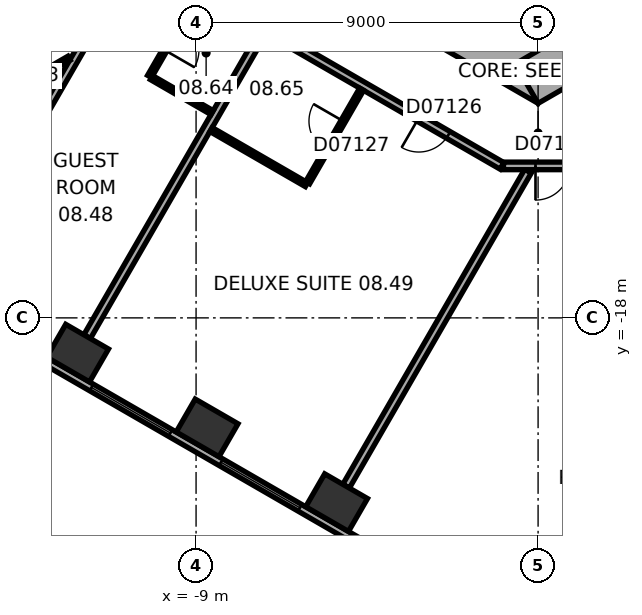
"""IFC4 building model, lengths in metres.
Left out: names, types, materials, properties, quantities, classifications, styles, units other than length and angle.
Written with IfcOpenShell. Run it as: python <this file> out.ifc"""

import sys

from ifc_helpers import new_model, si_unit, direction, frame, frame_2d, origin, origin_2d, place, context, subcontext, project, spatial, rectangle, extrude, element, fill, save


model = new_model("IFC4")
c1 = context("Model", 3, precision=1e-05, world=origin(), true_north=direction((0.0, 1.0)))
c2 = subcontext(c1, "Body", "Model", "MODEL_VIEW")
j1 = project(units=[si_unit("LENGTHUNIT", "METRE"), si_unit("PLANEANGLEUNIT", "RADIAN")], contexts=[c1])
p1 = place(None, origin())
s1 = spatial("IfcSite", under=j1, at=p1, CompositionType="ELEMENT")
p2 = place(p1, origin())
s2 = spatial("IfcBuilding", under=s1, at=p2, CompositionType="ELEMENT")
p3 = place(p2, frame((0.0, 0.0, 47.3)))
s3 = spatial("IfcBuildingStorey", under=s2, at=p3, CompositionType="ELEMENT", Elevation=47.3)
for number, where, z_axis, x_axis in (
    (1, (-12.117, -18.927, 0.0), (0.0, 0.0, 1.0), (0.866, -0.5, 0.0)),
    (2, (-8.71, -20.895, 0.0), (0.0, 0.0, 1.0), (0.866, -0.5, 0.0)),
    (3, (-5.302, -22.862, 0.0), (0.0, 0.0, 1.0), (0.866, -0.5, 0.0)),
):
    element("IfcColumn", number, at=place(p3, frame(where, z_axis=z_axis, x_axis=x_axis)), inside=s3, PredefinedType="COLUMN", context=c2, shape_type="SweptSolid", body=[
        extrude(rectangle(XDim=1.3, YDim=1.0, at=origin_2d()), origin(), (0.0, 0.0, 1.0), 3.3),
    ])
p4 = place(p3, frame((-10.4, -5.658, 0.0), z_axis=(0.0, 0.0, 1.0), x_axis=(0.866021384402, -0.500006961711, 0.0)))
e4 = element("IfcWall", 4, at=p4, inside=s3, PredefinedType="SHEAR", context=c2, shape_type="SweptSolid", body=[
    extrude(rectangle(XDim=12.355, YDim=1.2, at=frame_2d((6.178, 0.0))), origin(), (0.0, 0.0, 1.0), 3.3),
])
p5 = place(p4, frame((6.378, 0.0, 0.0)))
e5 = element("IfcOpeningElement", 5, at=p5, cuts=e4, PredefinedType="OPENING", context=c2, shape_type="SweptSolid", body=[
    extrude(rectangle(XDim=1.5, YDim=2.1, at=frame_2d((0.75, 1.05))), frame((0.0, 0.61, 0.0), z_axis=(0.0, -1.0, 0.0), x_axis=(1.0, 0.0, 0.0)), (0.0, 0.0, 1.0), 1.22),
])
p6 = place(p4, frame((3.228, 0.0, 0.0)))
e6 = element("IfcOpeningElement", 6, at=p6, cuts=e4, PredefinedType="OPENING", context=c2, shape_type="SweptSolid", body=[
    extrude(rectangle(XDim=0.9, YDim=2.1, at=frame_2d((0.45, 1.05))), frame((0.0, 0.61, 0.0), z_axis=(0.0, -1.0, 0.0), x_axis=(1.0, 0.0, 0.0)), (0.0, 0.0, 1.0), 1.22),
])
p7 = place(p3, frame((-0.3, -11.836, 0.0), z_axis=(0.0, 0.0, 1.0), x_axis=(0.866021384402, 0.500006961711, 0.0)))
e7 = element("IfcWall", 7, at=p7, inside=s3, PredefinedType="SHEAR", context=c2, shape_type="SweptSolid", body=[
    extrude(rectangle(XDim=12.355, YDim=1.2, at=frame_2d((6.178, 0.0))), origin(), (0.0, 0.0, 1.0), 3.3),
])
p8 = place(p7, frame((2.828, 0.0, 0.0)))
e8 = element("IfcOpeningElement", 8, at=p8, cuts=e7, PredefinedType="OPENING", context=c2, shape_type="SweptSolid", body=[
    extrude(rectangle(XDim=0.9, YDim=2.1, at=frame_2d((0.45, 1.05))), frame((0.0, 0.61, 0.0), z_axis=(0.0, -1.0, 0.0), x_axis=(1.0, 0.0, 0.0)), (0.0, 0.0, 1.0), 1.22),
])
p9 = place(p7, frame((5.428, 0.0, 0.0)))
e9 = element("IfcOpeningElement", 9, at=p9, cuts=e7, PredefinedType="OPENING", context=c2, shape_type="SweptSolid", body=[
    extrude(rectangle(XDim=0.9, YDim=2.1, at=frame_2d((0.45, 1.05))), frame((0.0, 0.61, 0.0), z_axis=(0.0, -1.0, 0.0), x_axis=(1.0, 0.0, 0.0)), (0.0, 0.0, 1.0), 1.22),
])
p10 = place(p7, frame((7.928, 0.0, 0.0)))
e10 = element("IfcOpeningElement", 10, at=p10, cuts=e7, PredefinedType="OPENING", context=c2, shape_type="SweptSolid", body=[
    extrude(rectangle(XDim=1.1, YDim=2.1, at=frame_2d((0.55, 1.05))), frame((0.0, 0.61, 0.0), z_axis=(0.0, -1.0, 0.0), x_axis=(1.0, 0.0, 0.0)), (0.0, 0.0, 1.0), 1.22),
])
p11 = place(p3, frame((-19.914, -15.119, 0.0), z_axis=(0.0, 0.0, 1.0), x_axis=(0.866025418898, -0.499999973822, 0.0)))
e11 = element("IfcWall", 11, at=p11, inside=s3, PredefinedType="STANDARD", context=c2, shape_type="SweptSolid", body=[
    extrude(rectangle(XDim=21.246, YDim=0.2, at=frame_2d((10.623, 0.0))), origin(), (0.0, 0.0, 1.0), 3.3),
])
p12 = place(p11, frame((1.555, 0.0, 0.8)))
e12 = element("IfcOpeningElement", 12, at=p12, cuts=e11, PredefinedType="OPENING", context=c2, shape_type="SweptSolid", body=[
    extrude(rectangle(XDim=2.4, YDim=1.7, at=frame_2d((1.2, 0.85))), frame((0.0, 0.11, 0.0), z_axis=(0.0, -1.0, 0.0), x_axis=(1.0, 0.0, 0.0)), (0.0, 0.0, 1.0), 0.22),
])
p13 = place(p11, frame((5.489, 0.0, 0.8)))
e13 = element("IfcOpeningElement", 13, at=p13, cuts=e11, PredefinedType="OPENING", context=c2, shape_type="SweptSolid", body=[
    extrude(rectangle(XDim=2.4, YDim=1.7, at=frame_2d((1.2, 0.85))), frame((0.0, 0.11, 0.0), z_axis=(0.0, -1.0, 0.0), x_axis=(1.0, 0.0, 0.0)), (0.0, 0.0, 1.0), 0.22),
])
p14 = place(p11, frame((9.424, 0.0, 0.8)))
e14 = element("IfcOpeningElement", 14, at=p14, cuts=e11, PredefinedType="OPENING", context=c2, shape_type="SweptSolid", body=[
    extrude(rectangle(XDim=2.4, YDim=1.7, at=frame_2d((1.2, 0.85))), frame((0.0, 0.11, 0.0), z_axis=(0.0, -1.0, 0.0), x_axis=(1.0, 0.0, 0.0)), (0.0, 0.0, 1.0), 0.22),
])
p15 = place(p11, frame((13.358, 0.0, 0.8)))
e15 = element("IfcOpeningElement", 15, at=p15, cuts=e11, PredefinedType="OPENING", context=c2, shape_type="SweptSolid", body=[
    extrude(rectangle(XDim=2.4, YDim=1.7, at=frame_2d((1.2, 0.85))), frame((0.0, 0.11, 0.0), z_axis=(0.0, -1.0, 0.0), x_axis=(1.0, 0.0, 0.0)), (0.0, 0.0, 1.0), 0.22),
])
p16 = place(p11, frame((17.293, 0.0, 0.8)))
e16 = element("IfcOpeningElement", 16, at=p16, cuts=e11, PredefinedType="OPENING", context=c2, shape_type="SweptSolid", body=[
    extrude(rectangle(XDim=2.4, YDim=1.7, at=frame_2d((1.2, 0.85))), frame((0.0, 0.11, 0.0), z_axis=(0.0, -1.0, 0.0), x_axis=(1.0, 0.0, 0.0)), (0.0, 0.0, 1.0), 0.22),
])
p17 = place(p3, frame((-15.274, -16.527, 0.0), z_axis=(0.0, 0.0, 1.0), x_axis=(0.49998823431, 0.866032196602, 0.0)))
e17 = element("IfcWall", 17, at=p17, inside=s3, PredefinedType="PARTITIONING", context=c2, shape_type="SweptSolid", body=[
    extrude(rectangle(XDim=9.25, YDim=0.2, at=frame_2d((4.625, 0.0))), origin(), (0.0, 0.0, 1.0), 3.05),
])
p18 = place(p3, frame((-12.342, -11.167, 0.0), z_axis=(0.0, 0.0, 1.0), x_axis=(-0.865992557167, -0.500056887695, 0.0)))
e18 = element("IfcWall", 18, at=p18, inside=s3, PredefinedType="PARTITIONING", context=c2, shape_type="SweptSolid", body=[
    extrude(rectangle(XDim=1.769, YDim=0.12, at=frame_2d((0.885, 0.0))), origin(), (0.0, 0.0, 1.0), 3.05),
])
p19 = place(p3, frame((-11.867, -18.494, 0.0), z_axis=(0.0, 0.0, 1.0), x_axis=(0.499999662836, 0.866025598446, 0.0)))
e19 = element("IfcWall", 19, at=p19, inside=s3, PredefinedType="PARTITIONING", context=c2, shape_type="SweptSolid", body=[
    extrude(rectangle(XDim=9.25, YDim=0.2, at=frame_2d((4.625, 0.0))), origin(), (0.0, 0.0, 1.0), 2.6),
])
p20 = place(p3, frame((-11.615, -7.843, 0.0), z_axis=(0.0, 0.0, 1.0), x_axis=(0.866026466995, -0.499998158461, 0.0)))
e20 = element("IfcWall", 20, at=p20, inside=s3, PredefinedType="PARTITIONING", context=c2, shape_type="SweptSolid", body=[
    extrude(rectangle(XDim=12.315, YDim=0.2, at=frame_2d((6.158, 0.0))), origin(), (0.0, 0.0, 1.0), 3.05),
])
p21 = place(p20, frame((1.665, 0.0, 0.0)))
e21 = element("IfcOpeningElement", 21, at=p21, cuts=e20, PredefinedType="OPENING", context=c2, shape_type="SweptSolid", body=[
    extrude(rectangle(XDim=0.9, YDim=2.1, at=frame_2d((0.45, 1.05))), frame((0.0, 0.11, 0.0), z_axis=(0.0, -1.0, 0.0), x_axis=(1.0, 0.0, 0.0)), (0.0, 0.0, 1.0), 0.22),
])
p22 = place(p20, frame((9.787, 0.0, 0.0)))
e22 = element("IfcOpeningElement", 22, at=p22, cuts=e20, PredefinedType="OPENING", context=c2, shape_type="SweptSolid", body=[
    extrude(rectangle(XDim=0.9, YDim=2.1, at=frame_2d((0.45, 1.05))), frame((0.0, 0.11, 0.0), z_axis=(0.0, -1.0, 0.0), x_axis=(1.0, 0.0, 0.0)), (0.0, 0.0, 1.0), 0.22),
])
p23 = place(p3, frame((-10.224, -11.648, 0.0), z_axis=(0.0, 0.0, 1.0), x_axis=(0.500004234368, 0.866022959057, 0.0)))
e23 = element("IfcWall", 23, at=p23, inside=s3, PredefinedType="PARTITIONING", context=c2, shape_type="SweptSolid", body=[
    extrude(rectangle(XDim=2.5, YDim=0.12, at=frame_2d((1.25, 0.0))), origin(), (0.0, 0.0, 1.0), 3.05),
])
p24 = place(p23, frame((0.8, 0.0, 0.0)))
e24 = element("IfcOpeningElement", 24, at=p24, cuts=e23, PredefinedType="OPENING", context=c2, shape_type="SweptSolid", body=[
    extrude(rectangle(XDim=0.9, YDim=2.1, at=frame_2d((0.45, 1.05))), frame((0.0, 0.07, 0.0), z_axis=(0.0, -1.0, 0.0), x_axis=(1.0, 0.0, 0.0)), (0.0, 0.0, 1.0), 0.14),
])
p25 = place(p3, frame((-8.579, -12.598, 0.0), z_axis=(0.0, 0.0, 1.0), x_axis=(-0.866046386007, 0.499963655964, 0.0)))
e25 = element("IfcWall", 25, at=p25, inside=s3, PredefinedType="PARTITIONING", context=c2, shape_type="SweptSolid", body=[
    extrude(rectangle(XDim=1.84, YDim=0.12, at=frame_2d((0.92, 0.0))), origin(), (0.0, 0.0, 1.0), 3.05),
])
p26 = place(p3, frame((-6.094, -14.495, 0.0), z_axis=(0.0, 0.0, 1.0), x_axis=(-0.866032775405, 0.499987231761, 0.0)))
e26 = element("IfcWall", 26, at=p26, inside=s3, PredefinedType="PARTITIONING", context=c2, shape_type="SweptSolid", body=[
    extrude(rectangle(XDim=2.9, YDim=0.12, at=frame_2d((1.45, 0.0))), origin(), (0.0, 0.0, 1.0), 3.05),
])
p27 = place(p3, frame((-5.052, -22.429, 0.0), z_axis=(0.0, 0.0, 1.0), x_axis=(0.500004329283, 0.866022904257, 0.0)))
e27 = element("IfcWall", 27, at=p27, inside=s3, PredefinedType="PARTITIONING", context=c2, shape_type="SweptSolid", body=[
    extrude(rectangle(XDim=9.572, YDim=0.2, at=frame_2d((4.786, 0.0))), origin(), (0.0, 0.0, 1.0), 3.05),
])
p28 = place(p3, frame((-4.644, -11.983, 0.0), z_axis=(0.0, 0.0, 1.0), x_axis=(-0.499985389037, -0.866033839264, 0.0)))
e28 = element("IfcWall", 28, at=p28, inside=s3, PredefinedType="PARTITIONING", context=c2, shape_type="SweptSolid", body=[
    extrude(rectangle(XDim=2.84, YDim=0.12, at=frame_2d((1.42, 0.0))), origin(), (0.0, 0.0, 1.0), 3.05),
])
p29 = place(p28, frame((0.97, 0.0, 0.0)))
e29 = element("IfcOpeningElement", 29, at=p29, cuts=e28, PredefinedType="OPENING", context=c2, shape_type="SweptSolid", body=[
    extrude(rectangle(XDim=0.9, YDim=2.1, at=frame_2d((0.45, 1.05))), frame((0.0, 0.07, 0.0), z_axis=(0.0, -1.0, 0.0), x_axis=(1.0, 0.0, 0.0)), (0.0, 0.0, 1.0), 0.14),
])
p30 = place(p3, frame((-0.91, -14.001, 0.0), z_axis=(0.0, 0.0, 1.0), x_axis=(1.0, 0.0, 0.0)))
e30 = element("IfcWall", 30, at=p30, inside=s3, PredefinedType="PARTITIONING", context=c2, shape_type="SweptSolid", body=[
    extrude(rectangle(XDim=1.86, YDim=0.2, at=frame_2d((0.93, 0.0))), origin(), (0.0, 0.0, 1.0), 3.05),
])
p31 = place(p30, frame((0.842, 0.0, 0.0)))
e31 = element("IfcOpeningElement", 31, at=p31, cuts=e30, PredefinedType="OPENING", context=c2, shape_type="SweptSolid", body=[
    extrude(rectangle(XDim=0.9, YDim=2.1, at=frame_2d((0.45, 1.05))), frame((0.0, 0.11, 0.0), z_axis=(0.0, -1.0, 0.0), x_axis=(1.0, 0.0, 0.0)), (0.0, 0.0, 1.0), 0.22),
])
p32 = place(p14, origin())
e32 = element("IfcWindow", 32, at=p32, inside=s3, PartitioningType="SINGLE_PANEL", PredefinedType="WINDOW", context=c2, shape_type="SweptSolid", body=[
    extrude(rectangle(XDim=2.4, YDim=1.7, at=frame_2d((1.2, 0.85))), frame((0.0, 0.03, 0.0), z_axis=(0.0, -1.0, 0.0), x_axis=(1.0, 0.0, 0.0)), (0.0, 0.0, 1.0), 0.06),
])
fill(e14, e32)
p33 = place(p15, origin())
e33 = element("IfcWindow", 33, at=p33, inside=s3, PartitioningType="SINGLE_PANEL", PredefinedType="WINDOW", context=c2, shape_type="SweptSolid", body=[
    extrude(rectangle(XDim=2.4, YDim=1.7, at=frame_2d((1.2, 0.85))), frame((0.0, 0.03, 0.0), z_axis=(0.0, -1.0, 0.0), x_axis=(1.0, 0.0, 0.0)), (0.0, 0.0, 1.0), 0.06),
])
fill(e15, e33)
p34 = place(p22, origin())
e34 = element("IfcDoor", 34, at=p34, inside=s3, OperationType="SINGLE_SWING_LEFT", PredefinedType="DOOR", context=c2, shape_type="SweptSolid", body=[
    extrude(rectangle(XDim=0.9, YDim=2.1, at=frame_2d((0.45, 1.05))), frame((0.0, 0.025, 0.0), z_axis=(0.0, -1.0, 0.0), x_axis=(1.0, 0.0, 0.0)), (0.0, 0.0, 1.0), 0.05),
])
fill(e22, e34)
p35 = place(p29, origin())
e35 = element("IfcDoor", 35, at=p35, inside=s3, OperationType="SINGLE_SWING_LEFT", PredefinedType="DOOR", context=c2, shape_type="SweptSolid", body=[
    extrude(rectangle(XDim=0.9, YDim=2.1, at=frame_2d((0.45, 1.05))), frame((0.0, 0.025, 0.0), z_axis=(0.0, -1.0, 0.0), x_axis=(1.0, 0.0, 0.0)), (0.0, 0.0, 1.0), 0.05),
])
fill(e29, e35)
p36 = place(p31, origin())
e36 = element("IfcDoor", 36, at=p36, inside=s3, OperationType="SINGLE_SWING_LEFT", PredefinedType="DOOR", context=c2, shape_type="SweptSolid", body=[
    extrude(rectangle(XDim=0.9, YDim=2.1, at=frame_2d((0.45, 1.05))), frame((0.0, 0.025, 0.0), z_axis=(0.0, -1.0, 0.0), x_axis=(1.0, 0.0, 0.0)), (0.0, 0.0, 1.0), 0.05),
])
fill(e31, e36)
save(model, sys.argv[1])
